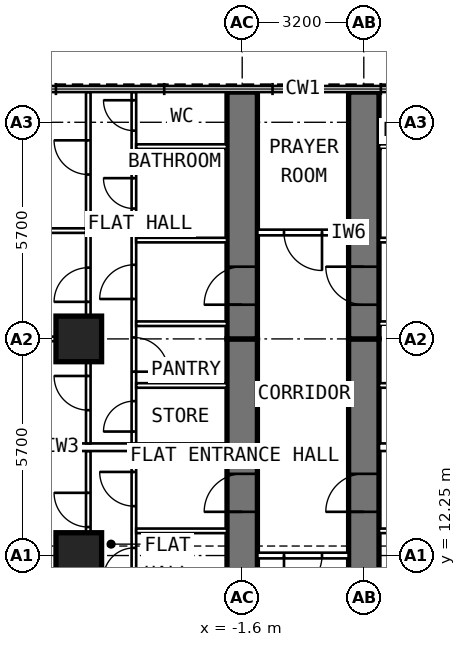
"""IFC4 building model, lengths in metres.
Left out: names, types, materials, properties, quantities, classifications, styles, units other than length and angle.
Written with IfcOpenShell. Run it as: python <this file> out.ifc"""

import sys

from ifc_helpers import new_model, si_unit, direction, frame, frame_2d, origin, origin_2d, place, context, subcontext, project, spatial, rectangle, extrude, element, fill, save


model = new_model("IFC4")
c1 = context("Model", 3, precision=1e-05, world=origin(), true_north=direction((0.0, 1.0)))
c2 = subcontext(c1, "Body", "Model", "MODEL_VIEW")
j1 = project(units=[si_unit("LENGTHUNIT", "METRE"), si_unit("PLANEANGLEUNIT", "RADIAN")], contexts=[c1])
p1 = place(None, origin())
s1 = spatial("IfcSite", under=j1, at=p1, CompositionType="ELEMENT")
p2 = place(p1, origin())
s2 = spatial("IfcBuilding", under=s1, at=p2, CompositionType="ELEMENT")
p3 = place(p2, frame((0.0, 0.0, 172.4)))
s3 = spatial("IfcBuildingStorey", under=s2, at=p3, CompositionType="ELEMENT", Elevation=172.4)
for number, where, z_axis, x_axis in (
    (1, (-5.9, 12.25, 0.0), (0.0, 0.0, 1.0), (0.0, 1.0, 0.0)),
    (2, (-5.9, 17.95, 0.0), (0.0, 0.0, 1.0), (0.0, 1.0, 0.0)),
):
    element("IfcColumn", number, at=place(p3, frame(where, z_axis=z_axis, x_axis=x_axis)), inside=s3, PredefinedType="COLUMN", context=c2, shape_type="SweptSolid", body=[
        extrude(rectangle(XDim=1.2, YDim=1.2, at=origin_2d()), origin(), (0.0, 0.0, 1.0), 3.6),
    ])
p4 = place(p3, frame((-1.6, 9.6, 0.0), z_axis=(0.0, 0.0, 1.0), x_axis=(0.0, 1.0, 0.0)))
e3 = element("IfcWall", 3, at=p4, inside=s3, PredefinedType="SHEAR", context=c2, shape_type="SweptSolid", body=[
    extrude(rectangle(XDim=8.35, YDim=0.8, at=frame_2d((4.175, 0.0))), origin(), (0.0, 0.0, 1.0), 3.6),
])
p5 = place(p4, frame((3.8, 0.0, 0.0)))
e4 = element("IfcOpeningElement", 4, at=p5, cuts=e3, PredefinedType="OPENING", context=c2, shape_type="SweptSolid", body=[
    extrude(rectangle(XDim=1.0, YDim=2.1, at=frame_2d((0.5, 1.05))), frame((0.0, 0.412, 0.0), z_axis=(0.0, -1.0, 0.0), x_axis=(1.0, 0.0, 0.0)), (0.0, 0.0, 1.0), 0.824),
])
p6 = place(p3, frame((-1.6, 17.95, 0.0), z_axis=(0.0, 0.0, 1.0), x_axis=(0.0, 1.0, 0.0)))
e5 = element("IfcWall", 5, at=p6, inside=s3, PredefinedType="SHEAR", context=c2, shape_type="SweptSolid", body=[
    extrude(rectangle(XDim=6.495, YDim=0.8, at=frame_2d((3.248, 0.0))), origin(), (0.0, 0.0, 1.0), 3.6),
])
p7 = place(p6, frame((0.9, 0.0, 0.0)))
e6 = element("IfcOpeningElement", 6, at=p7, cuts=e5, PredefinedType="OPENING", context=c2, shape_type="SweptSolid", body=[
    extrude(rectangle(XDim=1.0, YDim=2.1, at=frame_2d((0.5, 1.05))), frame((0.0, 0.412, 0.0), z_axis=(0.0, -1.0, 0.0), x_axis=(1.0, 0.0, 0.0)), (0.0, 0.0, 1.0), 0.824),
])
p8 = place(p3, frame((1.6, 9.6, 0.0), z_axis=(0.0, 0.0, 1.0), x_axis=(0.0, 1.0, 0.0)))
e7 = element("IfcWall", 7, at=p8, inside=s3, PredefinedType="SHEAR", context=c2, shape_type="SweptSolid", body=[
    extrude(rectangle(XDim=8.35, YDim=0.8, at=frame_2d((4.175, 0.0))), origin(), (0.0, 0.0, 1.0), 3.6),
])
p9 = place(p8, frame((3.8, 0.0, 0.0)))
e8 = element("IfcOpeningElement", 8, at=p9, cuts=e7, PredefinedType="OPENING", context=c2, shape_type="SweptSolid", body=[
    extrude(rectangle(XDim=1.0, YDim=2.1, at=frame_2d((0.5, 1.05))), frame((0.0, 0.412, 0.0), z_axis=(0.0, -1.0, 0.0), x_axis=(1.0, 0.0, 0.0)), (0.0, 0.0, 1.0), 0.824),
])
p10 = place(p3, frame((1.6, 17.95, 0.0), z_axis=(0.0, 0.0, 1.0), x_axis=(0.0, 1.0, 0.0)))
e9 = element("IfcWall", 9, at=p10, inside=s3, PredefinedType="SHEAR", context=c2, shape_type="SweptSolid", body=[
    extrude(rectangle(XDim=6.495, YDim=0.8, at=frame_2d((3.248, 0.0))), origin(), (0.0, 0.0, 1.0), 3.6),
])
p11 = place(p10, frame((0.9, 0.0, 0.0)))
e10 = element("IfcOpeningElement", 10, at=p11, cuts=e9, PredefinedType="OPENING", context=c2, shape_type="SweptSolid", body=[
    extrude(rectangle(XDim=1.0, YDim=2.1, at=frame_2d((0.5, 1.05))), frame((0.0, 0.412, 0.0), z_axis=(0.0, -1.0, 0.0), x_axis=(1.0, 0.0, 0.0)), (0.0, 0.0, 1.0), 0.824),
])
p12 = place(p3, frame((-4.45, 10.05, 0.0), z_axis=(0.0, 0.0, 1.0), x_axis=(0.0, 1.0, 0.0)))
e11 = element("IfcWall", 11, at=p12, inside=s3, PredefinedType="PARTITIONING", context=c2, shape_type="SweptSolid", body=[
    extrude(rectangle(XDim=4.95, YDim=0.12, at=frame_2d((2.475, 0.0))), origin(), (0.0, 0.0, 1.0), 3.35),
])
p13 = place(p12, frame((1.6, 0.0, 0.0)))
e12 = element("IfcOpeningElement", 12, at=p13, cuts=e11, PredefinedType="OPENING", context=c2, shape_type="SweptSolid", body=[
    extrude(rectangle(XDim=0.8, YDim=2.1, at=frame_2d((0.4, 1.05))), frame((0.0, 0.072, 0.0), z_axis=(0.0, -1.0, 0.0), x_axis=(1.0, 0.0, 0.0)), (0.0, 0.0, 1.0), 0.144),
])
p14 = place(p12, frame((3.5, 0.0, 0.0)))
e13 = element("IfcOpeningElement", 13, at=p14, cuts=e11, PredefinedType="OPENING", context=c2, shape_type="SweptSolid", body=[
    extrude(rectangle(XDim=0.9, YDim=2.1, at=frame_2d((0.45, 1.05))), frame((0.0, 0.072, 0.0), z_axis=(0.0, -1.0, 0.0), x_axis=(1.0, 0.0, 0.0)), (0.0, 0.0, 1.0), 0.144),
])
p15 = place(p3, frame((-5.65, 9.6, 0.0), z_axis=(0.0, 0.0, 1.0), x_axis=(0.0, 1.0, 0.0)))
e14 = element("IfcWall", 14, at=p15, inside=s3, PredefinedType="PARTITIONING", context=c2, shape_type="SweptSolid", body=[
    extrude(rectangle(XDim=5.4, YDim=0.12, at=frame_2d((2.7, 0.0))), origin(), (0.0, 0.0, 1.0), 3.35),
])
p16 = place(p15, frame((3.4, 0.0, 0.0)))
e15 = element("IfcOpeningElement", 15, at=p16, cuts=e14, PredefinedType="OPENING", context=c2, shape_type="SweptSolid", body=[
    extrude(rectangle(XDim=0.9, YDim=2.1, at=frame_2d((0.45, 1.05))), frame((0.0, 0.072, 0.0), z_axis=(0.0, -1.0, 0.0), x_axis=(1.0, 0.0, 0.0)), (0.0, 0.0, 1.0), 0.144),
])
p17 = place(p3, frame((-2.0, 12.9, 0.0), z_axis=(0.0, 0.0, 1.0), x_axis=(-1.0, 0.0, 0.0)))
e16 = element("IfcWall", 16, at=p17, inside=s3, PredefinedType="PARTITIONING", context=c2, shape_type="SweptSolid", body=[
    extrude(rectangle(XDim=2.39, YDim=0.12, at=frame_2d((1.195, 0.0))), origin(), (0.0, 0.0, 1.0), 3.35),
])
p18 = place(p3, frame((-4.45, 15.2, 0.0), z_axis=(0.0, 0.0, 1.0), x_axis=(0.0, 1.0, 0.0)))
e17 = element("IfcWall", 17, at=p18, inside=s3, PredefinedType="PARTITIONING", context=c2, shape_type="SweptSolid", body=[
    extrude(rectangle(XDim=9.245, YDim=0.12, at=frame_2d((4.623, 0.0))), origin(), (0.0, 0.0, 1.0), 3.35),
])
p19 = place(p18, frame((0.312, 0.0, 0.0)))
e18 = element("IfcOpeningElement", 18, at=p19, cuts=e17, PredefinedType="OPENING", context=c2, shape_type="SweptSolid", body=[
    extrude(rectangle(XDim=0.8, YDim=2.1, at=frame_2d((0.4, 1.05))), frame((0.0, 0.072, 0.0), z_axis=(0.0, -1.0, 0.0), x_axis=(1.0, 0.0, 0.0)), (0.0, 0.0, 1.0), 0.144),
])
p20 = place(p18, frame((1.887, 0.0, 0.0)))
e19 = element("IfcOpeningElement", 19, at=p20, cuts=e17, PredefinedType="OPENING", context=c2, shape_type="SweptSolid", body=[
    extrude(rectangle(XDim=0.9, YDim=2.1, at=frame_2d((0.45, 1.05))), frame((0.0, 0.072, 0.0), z_axis=(0.0, -1.0, 0.0), x_axis=(1.0, 0.0, 0.0)), (0.0, 0.0, 1.0), 0.144),
])
p21 = place(p18, frame((3.8, 0.0, 0.0)))
e20 = element("IfcOpeningElement", 20, at=p21, cuts=e17, PredefinedType="OPENING", context=c2, shape_type="SweptSolid", body=[
    extrude(rectangle(XDim=0.9, YDim=2.1, at=frame_2d((0.45, 1.05))), frame((0.0, 0.072, 0.0), z_axis=(0.0, -1.0, 0.0), x_axis=(1.0, 0.0, 0.0)), (0.0, 0.0, 1.0), 0.144),
])
p22 = place(p18, frame((6.18, 0.0, 0.0)))
e21 = element("IfcOpeningElement", 21, at=p22, cuts=e17, PredefinedType="OPENING", context=c2, shape_type="SweptSolid", body=[
    extrude(rectangle(XDim=0.8, YDim=2.1, at=frame_2d((0.4, 1.05))), frame((0.0, 0.072, 0.0), z_axis=(0.0, -1.0, 0.0), x_axis=(1.0, 0.0, 0.0)), (0.0, 0.0, 1.0), 0.144),
])
p23 = place(p18, frame((8.23, 0.0, 0.0)))
e22 = element("IfcOpeningElement", 22, at=p23, cuts=e17, PredefinedType="OPENING", context=c2, shape_type="SweptSolid", body=[
    extrude(rectangle(XDim=0.8, YDim=2.1, at=frame_2d((0.4, 1.05))), frame((0.0, 0.072, 0.0), z_axis=(0.0, -1.0, 0.0), x_axis=(1.0, 0.0, 0.0)), (0.0, 0.0, 1.0), 0.144),
])
p24 = place(p3, frame((-5.65, 15.2, 0.0), z_axis=(0.0, 0.0, 1.0), x_axis=(0.0, 1.0, 0.0)))
e23 = element("IfcWall", 23, at=p24, inside=s3, PredefinedType="PARTITIONING", context=c2, shape_type="SweptSolid", body=[
    extrude(rectangle(XDim=9.245, YDim=0.12, at=frame_2d((4.623, 0.0))), origin(), (0.0, 0.0, 1.0), 3.35),
])
p25 = place(p24, frame((0.875, 0.0, 0.0)))
e24 = element("IfcOpeningElement", 24, at=p25, cuts=e23, PredefinedType="OPENING", context=c2, shape_type="SweptSolid", body=[
    extrude(rectangle(XDim=0.9, YDim=2.1, at=frame_2d((0.45, 1.05))), frame((0.0, 0.072, 0.0), z_axis=(0.0, -1.0, 0.0), x_axis=(1.0, 0.0, 0.0)), (0.0, 0.0, 1.0), 0.144),
])
p26 = place(p24, frame((3.725, 0.0, 0.0)))
e25 = element("IfcOpeningElement", 25, at=p26, cuts=e23, PredefinedType="OPENING", context=c2, shape_type="SweptSolid", body=[
    extrude(rectangle(XDim=0.9, YDim=2.1, at=frame_2d((0.45, 1.05))), frame((0.0, 0.072, 0.0), z_axis=(0.0, -1.0, 0.0), x_axis=(1.0, 0.0, 0.0)), (0.0, 0.0, 1.0), 0.144),
])
p27 = place(p24, frame((7.075, 0.0, 0.0)))
e26 = element("IfcOpeningElement", 26, at=p27, cuts=e23, PredefinedType="OPENING", context=c2, shape_type="SweptSolid", body=[
    extrude(rectangle(XDim=0.9, YDim=2.1, at=frame_2d((0.45, 1.05))), frame((0.0, 0.072, 0.0), z_axis=(0.0, -1.0, 0.0), x_axis=(1.0, 0.0, 0.0)), (0.0, 0.0, 1.0), 0.144),
])
p28 = place(p3, frame((-5.71, 17.95, 0.0), z_axis=(0.0, 0.0, 1.0), x_axis=(-1.0, 0.0, 0.0)))
e27 = element("IfcWall", 27, at=p28, inside=s3, PredefinedType="PARTITIONING", context=c2, shape_type="SweptSolid", body=[
    extrude(rectangle(XDim=4.99, YDim=0.12, at=frame_2d((2.495, 0.0))), origin(), (0.0, 0.0, 1.0), 2.45),
])
p29 = place(p3, frame((-5.71, 20.8, 0.0), z_axis=(0.0, 0.0, 1.0), x_axis=(-1.0, 0.0, 0.0)))
e28 = element("IfcWall", 28, at=p29, inside=s3, PredefinedType="PARTITIONING", context=c2, shape_type="SweptSolid", body=[
    extrude(rectangle(XDim=4.99, YDim=0.12, at=frame_2d((2.495, 0.0))), origin(), (0.0, 0.0, 1.0), 3.35),
])
for number, where, z_axis, x_axis in (
    (29, (-2.0, 16.725, 0.0), (0.0, 0.0, 1.0), (-1.0, 0.0, 0.0)),
    (30, (-2.0, 18.35, 0.0), (0.0, 0.0, 1.0), (-1.0, 0.0, 0.0)),
    (31, (-2.0, 20.55, 0.0), (0.0, 0.0, 1.0), (-1.0, 0.0, 0.0)),
    (32, (-2.0, 23.01, 0.0), (0.0, 0.0, 1.0), (-1.0, 0.0, 0.0)),
):
    element("IfcWall", number, at=place(p3, frame(where, z_axis=z_axis, x_axis=x_axis)), inside=s3, PredefinedType="PARTITIONING", context=c2, shape_type="SweptSolid", body=[
        extrude(rectangle(XDim=2.39, YDim=0.12, at=frame_2d((1.195, 0.0))), origin(), (0.0, 0.0, 1.0), 3.35),
    ])
p30 = place(p3, frame((-2.0, 15.1, 0.0), z_axis=(0.0, 0.0, 1.0), x_axis=(-1.0, 0.0, 0.0)))
e33 = element("IfcWall", 33, at=p30, inside=s3, PredefinedType="PARTITIONING", context=c2, shape_type="SweptSolid", body=[
    extrude(rectangle(XDim=8.7, YDim=0.2, at=frame_2d((4.35, 0.0))), origin(), (0.0, 0.0, 1.0), 3.35),
])
for number, where, z_axis, x_axis in (
    (34, (2.0, 12.9, 0.0), (0.0, 0.0, 1.0), (1.0, 0.0, 0.0)),
    (35, (2.0, 16.725, 0.0), (0.0, 0.0, 1.0), (1.0, 0.0, 0.0)),
    (36, (2.0, 18.35, 0.0), (0.0, 0.0, 1.0), (1.0, 0.0, 0.0)),
    (37, (2.0, 20.55, 0.0), (0.0, 0.0, 1.0), (1.0, 0.0, 0.0)),
    (38, (2.0, 23.01, 0.0), (0.0, 0.0, 1.0), (1.0, 0.0, 0.0)),
):
    element("IfcWall", number, at=place(p3, frame(where, z_axis=z_axis, x_axis=x_axis)), inside=s3, PredefinedType="PARTITIONING", context=c2, shape_type="SweptSolid", body=[
        extrude(rectangle(XDim=2.39, YDim=0.12, at=frame_2d((1.195, 0.0))), origin(), (0.0, 0.0, 1.0), 3.35),
    ])
p31 = place(p3, frame((2.0, 15.1, 0.0), z_axis=(0.0, 0.0, 1.0), x_axis=(1.0, 0.0, 0.0)))
e39 = element("IfcWall", 39, at=p31, inside=s3, PredefinedType="PARTITIONING", context=c2, shape_type="SweptSolid", body=[
    extrude(rectangle(XDim=8.7, YDim=0.2, at=frame_2d((4.35, 0.0))), origin(), (0.0, 0.0, 1.0), 3.35),
])
p32 = place(p3, frame((1.2, 20.75, 0.0), z_axis=(0.0, 0.0, 1.0), x_axis=(-1.0, 0.0, 0.0)))
e40 = element("IfcWall", 40, at=p32, inside=s3, PredefinedType="PARTITIONING", context=c2, shape_type="SweptSolid", body=[
    extrude(rectangle(XDim=2.4, YDim=0.15, at=frame_2d((1.2, 0.0))), origin(), (0.0, 0.0, 1.0), 3.35),
])
p33 = place(p32, frame((0.7, 0.0, 0.0)))
e41 = element("IfcOpeningElement", 41, at=p33, cuts=e40, PredefinedType="OPENING", context=c2, shape_type="SweptSolid", body=[
    extrude(rectangle(XDim=1.0, YDim=2.1, at=frame_2d((0.5, 1.05))), frame((0.0, 0.087, 0.0), z_axis=(0.0, -1.0, 0.0), x_axis=(1.0, 0.0, 0.0)), (0.0, 0.0, 1.0), 0.174),
])
p34 = place(p3, frame((1.2, 12.25, 0.0), z_axis=(0.0, 0.0, 1.0), x_axis=(-1.0, 0.0, 0.0)))
e42 = element("IfcWall", 42, at=p34, inside=s3, PredefinedType="PARTITIONING", context=c2, shape_type="SweptSolid", body=[
    extrude(rectangle(XDim=2.4, YDim=0.15, at=frame_2d((1.2, 0.0))), origin(), (0.0, 0.0, 1.0), 3.35),
])
p35 = place(p34, frame((0.7, 0.0, 0.0)))
e43 = element("IfcOpeningElement", 43, at=p35, cuts=e42, PredefinedType="OPENING", context=c2, shape_type="SweptSolid", body=[
    extrude(rectangle(XDim=1.0, YDim=2.1, at=frame_2d((0.5, 1.05))), frame((0.0, 0.087, 0.0), z_axis=(0.0, -1.0, 0.0), x_axis=(1.0, 0.0, 0.0)), (0.0, 0.0, 1.0), 0.174),
])
p36 = place(p5, origin())
e44 = element("IfcDoor", 44, at=p36, inside=s3, OperationType="SINGLE_SWING_LEFT", PredefinedType="DOOR", context=c2, shape_type="SweptSolid", body=[
    extrude(rectangle(XDim=1.0, YDim=2.1, at=frame_2d((0.5, 1.05))), frame((0.0, 0.15, 0.0), z_axis=(0.0, -1.0, 0.0), x_axis=(1.0, 0.0, 0.0)), (0.0, 0.0, 1.0), 0.3),
])
fill(e4, e44)
p37 = place(p16, origin())
e45 = element("IfcDoor", 45, at=p37, inside=s3, OperationType="SINGLE_SWING_RIGHT", PredefinedType="DOOR", context=c2, shape_type="SweptSolid", body=[
    extrude(rectangle(XDim=0.9, YDim=2.1, at=frame_2d((0.45, 1.05))), frame((0.0, 0.025, 0.0), z_axis=(0.0, -1.0, 0.0), x_axis=(1.0, 0.0, 0.0)), (0.0, 0.0, 1.0), 0.05),
])
fill(e15, e45)
p38 = place(p13, origin())
e46 = element("IfcDoor", 46, at=p38, inside=s3, OperationType="SINGLE_SWING_LEFT", PredefinedType="DOOR", context=c2, shape_type="SweptSolid", body=[
    extrude(rectangle(XDim=0.8, YDim=2.1, at=frame_2d((0.4, 1.05))), frame((0.0, 0.025, 0.0), z_axis=(0.0, -1.0, 0.0), x_axis=(1.0, 0.0, 0.0)), (0.0, 0.0, 1.0), 0.05),
])
fill(e12, e46)
p39 = place(p14, origin())
e47 = element("IfcDoor", 47, at=p39, inside=s3, OperationType="SINGLE_SWING_RIGHT", PredefinedType="DOOR", context=c2, shape_type="SweptSolid", body=[
    extrude(rectangle(XDim=0.9, YDim=2.1, at=frame_2d((0.45, 1.05))), frame((0.0, 0.025, 0.0), z_axis=(0.0, -1.0, 0.0), x_axis=(1.0, 0.0, 0.0)), (0.0, 0.0, 1.0), 0.05),
])
fill(e13, e47)
p40 = place(p7, origin())
e48 = element("IfcDoor", 48, at=p40, inside=s3, OperationType="SINGLE_SWING_LEFT", PredefinedType="DOOR", context=c2, shape_type="SweptSolid", body=[
    extrude(rectangle(XDim=1.0, YDim=2.1, at=frame_2d((0.5, 1.05))), frame((0.0, 0.15, 0.0), z_axis=(0.0, -1.0, 0.0), x_axis=(1.0, 0.0, 0.0)), (0.0, 0.0, 1.0), 0.3),
])
fill(e6, e48)
p41 = place(p25, origin())
e49 = element("IfcDoor", 49, at=p41, inside=s3, OperationType="SINGLE_SWING_RIGHT", PredefinedType="DOOR", context=c2, shape_type="SweptSolid", body=[
    extrude(rectangle(XDim=0.9, YDim=2.1, at=frame_2d((0.45, 1.05))), frame((0.0, 0.025, 0.0), z_axis=(0.0, -1.0, 0.0), x_axis=(1.0, 0.0, 0.0)), (0.0, 0.0, 1.0), 0.05),
])
fill(e24, e49)
p42 = place(p26, origin())
e50 = element("IfcDoor", 50, at=p42, inside=s3, OperationType="SINGLE_SWING_LEFT", PredefinedType="DOOR", context=c2, shape_type="SweptSolid", body=[
    extrude(rectangle(XDim=0.9, YDim=2.1, at=frame_2d((0.45, 1.05))), frame((0.0, 0.025, 0.0), z_axis=(0.0, -1.0, 0.0), x_axis=(1.0, 0.0, 0.0)), (0.0, 0.0, 1.0), 0.05),
])
fill(e25, e50)
p43 = place(p27, origin())
e51 = element("IfcDoor", 51, at=p43, inside=s3, OperationType="SINGLE_SWING_RIGHT", PredefinedType="DOOR", context=c2, shape_type="SweptSolid", body=[
    extrude(rectangle(XDim=0.9, YDim=2.1, at=frame_2d((0.45, 1.05))), frame((0.0, 0.025, 0.0), z_axis=(0.0, -1.0, 0.0), x_axis=(1.0, 0.0, 0.0)), (0.0, 0.0, 1.0), 0.05),
])
fill(e26, e51)
p44 = place(p19, origin())
e52 = element("IfcDoor", 52, at=p44, inside=s3, OperationType="SINGLE_SWING_LEFT", PredefinedType="DOOR", context=c2, shape_type="SweptSolid", body=[
    extrude(rectangle(XDim=0.8, YDim=2.1, at=frame_2d((0.4, 1.05))), frame((0.0, 0.025, 0.0), z_axis=(0.0, -1.0, 0.0), x_axis=(1.0, 0.0, 0.0)), (0.0, 0.0, 1.0), 0.05),
])
fill(e18, e52)
p45 = place(p20, frame((0.9, 0.0, 0.0), z_axis=(0.0, 0.0, 1.0), x_axis=(-1.0, 0.0, 0.0)))
e53 = element("IfcDoor", 53, at=p45, inside=s3, OperationType="SINGLE_SWING_RIGHT", PredefinedType="DOOR", context=c2, shape_type="SweptSolid", body=[
    extrude(rectangle(XDim=0.9, YDim=2.1, at=frame_2d((0.45, 1.05))), frame((0.0, 0.025, 0.0), z_axis=(0.0, -1.0, 0.0), x_axis=(1.0, 0.0, 0.0)), (0.0, 0.0, 1.0), 0.05),
])
fill(e19, e53)
p46 = place(p21, origin())
e54 = element("IfcDoor", 54, at=p46, inside=s3, OperationType="SINGLE_SWING_LEFT", PredefinedType="DOOR", context=c2, shape_type="SweptSolid", body=[
    extrude(rectangle(XDim=0.9, YDim=2.1, at=frame_2d((0.45, 1.05))), frame((0.0, 0.025, 0.0), z_axis=(0.0, -1.0, 0.0), x_axis=(1.0, 0.0, 0.0)), (0.0, 0.0, 1.0), 0.05),
])
fill(e20, e54)
p47 = place(p22, origin())
e55 = element("IfcDoor", 55, at=p47, inside=s3, OperationType="SINGLE_SWING_RIGHT", PredefinedType="DOOR", context=c2, shape_type="SweptSolid", body=[
    extrude(rectangle(XDim=0.8, YDim=2.1, at=frame_2d((0.4, 1.05))), frame((0.0, 0.025, 0.0), z_axis=(0.0, -1.0, 0.0), x_axis=(1.0, 0.0, 0.0)), (0.0, 0.0, 1.0), 0.05),
])
fill(e21, e55)
p48 = place(p23, origin())
e56 = element("IfcDoor", 56, at=p48, inside=s3, OperationType="SINGLE_SWING_RIGHT", PredefinedType="DOOR", context=c2, shape_type="SweptSolid", body=[
    extrude(rectangle(XDim=0.8, YDim=2.1, at=frame_2d((0.4, 1.05))), frame((0.0, 0.025, 0.0), z_axis=(0.0, -1.0, 0.0), x_axis=(1.0, 0.0, 0.0)), (0.0, 0.0, 1.0), 0.05),
])
fill(e22, e56)
p49 = place(p9, origin())
e57 = element("IfcDoor", 57, at=p49, inside=s3, OperationType="SINGLE_SWING_LEFT", PredefinedType="DOOR", context=c2, shape_type="SweptSolid", body=[
    extrude(rectangle(XDim=1.0, YDim=2.1, at=frame_2d((0.5, 1.05))), frame((0.0, 0.15, 0.0), z_axis=(0.0, -1.0, 0.0), x_axis=(1.0, 0.0, 0.0)), (0.0, 0.0, 1.0), 0.3),
])
fill(e8, e57)
p50 = place(p11, origin())
e58 = element("IfcDoor", 58, at=p50, inside=s3, OperationType="SINGLE_SWING_RIGHT", PredefinedType="DOOR", context=c2, shape_type="SweptSolid", body=[
    extrude(rectangle(XDim=1.0, YDim=2.1, at=frame_2d((0.5, 1.05))), frame((0.0, 0.15, 0.0), z_axis=(0.0, -1.0, 0.0), x_axis=(1.0, 0.0, 0.0)), (0.0, 0.0, 1.0), 0.3),
])
fill(e10, e58)
p51 = place(p33, origin())
e59 = element("IfcDoor", 59, at=p51, inside=s3, OperationType="SINGLE_SWING_LEFT", PredefinedType="DOOR", context=c2, shape_type="SweptSolid", body=[
    extrude(rectangle(XDim=1.0, YDim=2.1, at=frame_2d((0.5, 1.05))), frame((0.0, 0.025, 0.0), z_axis=(0.0, -1.0, 0.0), x_axis=(1.0, 0.0, 0.0)), (0.0, 0.0, 1.0), 0.05),
])
fill(e41, e59)
p52 = place(p35, origin())
e60 = element("IfcDoor", 60, at=p52, inside=s3, OperationType="SINGLE_SWING_RIGHT", PredefinedType="DOOR", context=c2, shape_type="SweptSolid", body=[
    extrude(rectangle(XDim=1.0, YDim=2.1, at=frame_2d((0.5, 1.05))), frame((0.0, 0.025, 0.0), z_axis=(0.0, -1.0, 0.0), x_axis=(1.0, 0.0, 0.0)), (0.0, 0.0, 1.0), 0.05),
])
fill(e43, e60)
save(model, sys.argv[1])
